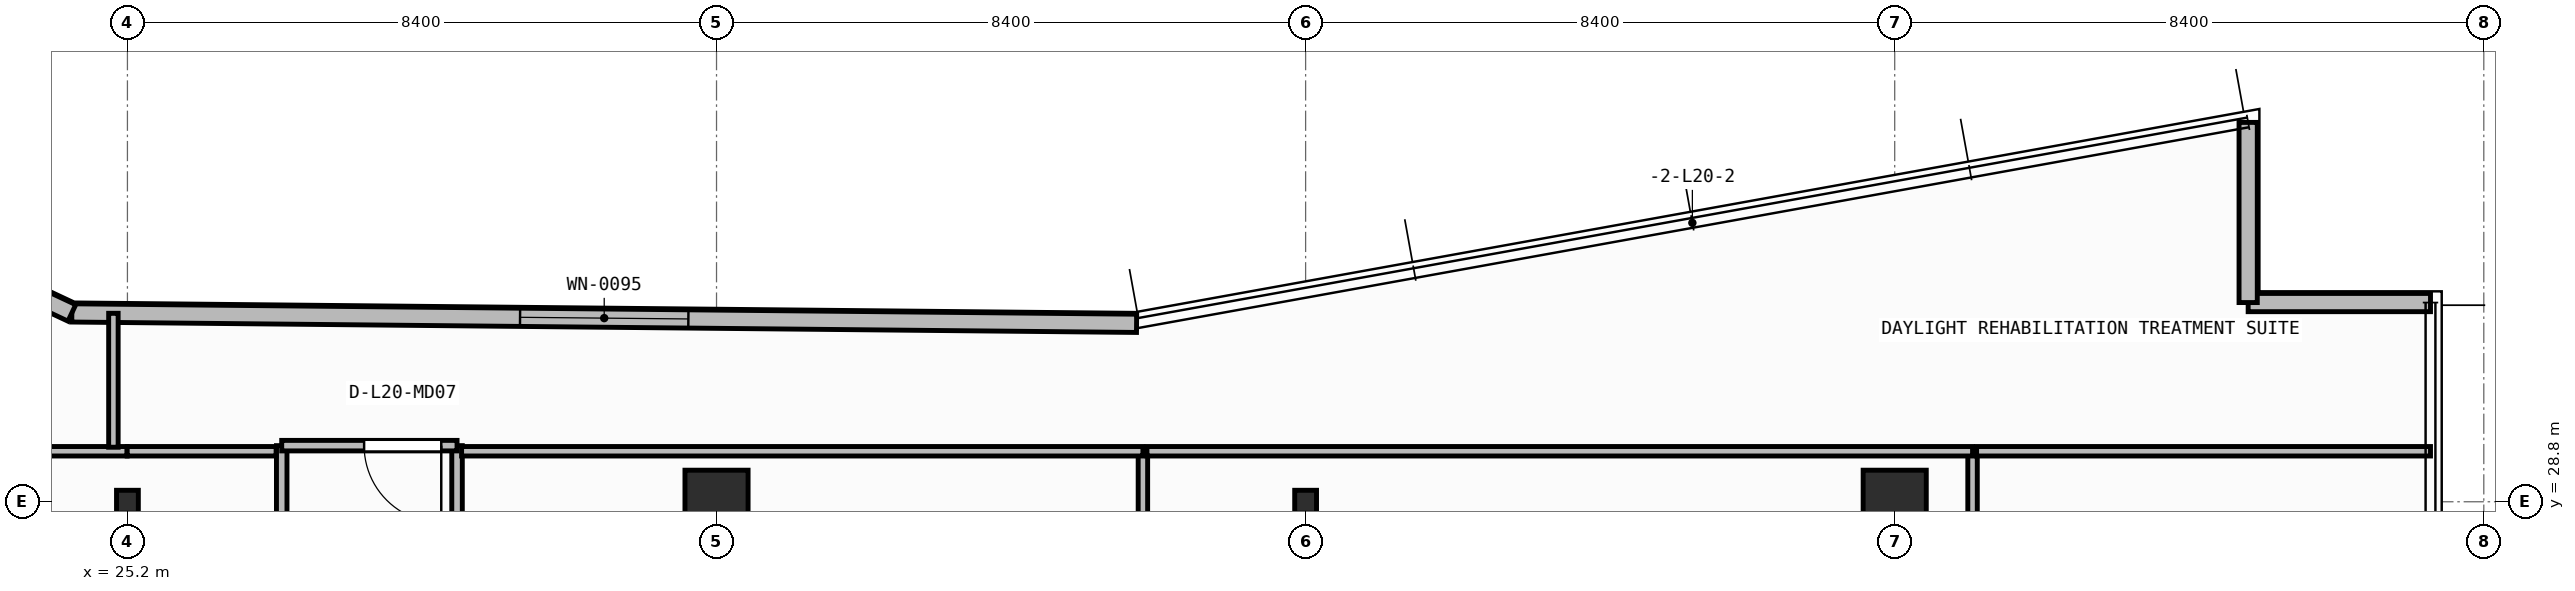
"""IFC4 building model, lengths in metres.
Left out: names, types, materials, properties, quantities, classifications, styles, units other than length and angle.
Written with IfcOpenShell. Run it as: python <this file> out.ifc"""

import sys

from ifc_helpers import new_model, si_unit, direction, frame, frame_2d, origin, origin_2d, place, context, subcontext, project, spatial, rectangle, i_section, extrude, element, fill, save


model = new_model("IFC4")
c1 = context("Model", 3, precision=1e-05, world=origin(), true_north=direction((0.0, 1.0)))
c2 = subcontext(c1, "Body", "Model", "MODEL_VIEW")
j1 = project(units=[si_unit("LENGTHUNIT", "METRE"), si_unit("PLANEANGLEUNIT", "RADIAN")], contexts=[c1])
p1 = place(None, origin())
s1 = spatial("IfcSite", under=j1, at=p1, CompositionType="ELEMENT")
p2 = place(p1, origin())
s2 = spatial("IfcBuilding", under=s1, at=p2, CompositionType="ELEMENT")
p3 = place(p2, frame((0.0, 0.0, 81.75)))
s3 = spatial("IfcBuildingStorey", under=s2, at=p3, CompositionType="ELEMENT", Elevation=81.75)
p4 = place(p3, frame((25.2, 28.8, 0.0), z_axis=(0.0, 0.0, 1.0), x_axis=(1.0, 0.0, 0.0)))
e1 = element("IfcColumn", 1, at=p4, inside=s3, PredefinedType="COLUMN", context=c2, shape_type="SweptSolid", body=[
    extrude(i_section(OverallWidth=0.311, OverallDepth=0.327, WebThickness=0.016, FlangeThickness=0.025, FilletRadius=0.017, at=origin_2d()), origin(), (0.0, 0.0, 1.0), 3.95),
])
p5 = place(p3, frame((33.6, 28.8, 0.0), z_axis=(0.0, 0.0, 1.0), x_axis=(1.0, 0.0, 0.0)))
e2 = element("IfcColumn", 2, at=p5, inside=s3, PredefinedType="COLUMN", context=c2, shape_type="SweptSolid", body=[
    extrude(rectangle(XDim=0.9, YDim=0.9, at=origin_2d()), origin(), (0.0, 0.0, 1.0), 3.95),
])
p6 = place(p3, frame((42.0, 28.8, 0.0), z_axis=(0.0, 0.0, 1.0), x_axis=(1.0, 0.0, 0.0)))
e3 = element("IfcColumn", 3, at=p6, inside=s3, PredefinedType="COLUMN", context=c2, shape_type="SweptSolid", body=[
    extrude(i_section(OverallWidth=0.311, OverallDepth=0.327, WebThickness=0.016, FlangeThickness=0.025, FilletRadius=0.017, at=origin_2d()), origin(), (0.0, 0.0, 1.0), 3.95),
])
p7 = place(p3, frame((50.4, 28.8, 0.0), z_axis=(0.0, 0.0, 1.0), x_axis=(1.0, 0.0, 0.0)))
e4 = element("IfcColumn", 4, at=p7, inside=s3, PredefinedType="COLUMN", context=c2, shape_type="SweptSolid", body=[
    extrude(rectangle(XDim=0.9, YDim=0.9, at=origin_2d()), origin(), (0.0, 0.0, 1.0), 3.95),
])
p8 = place(p3, frame((58.04, 31.64, 0.0), z_axis=(0.0, 0.0, 1.0), x_axis=(-1.0, 0.0, 0.0)))
e5 = element("IfcWall", 5, at=p8, inside=s3, PredefinedType="STANDARD", context=c2, shape_type="SweptSolid", body=[
    extrude(rectangle(XDim=2.6, YDim=0.26, at=frame_2d((1.3, 0.0))), origin(), (0.0, 0.0, 1.0), 3.71),
])
p9 = place(p3, frame((55.44, 31.64, 0.0), z_axis=(0.0, 0.0, 1.0), x_axis=(0.0, 1.0, 0.0)))
e6 = element("IfcWall", 6, at=p9, inside=s3, PredefinedType="STANDARD", context=c2, shape_type="SweptSolid", body=[
    extrude(rectangle(XDim=2.569, YDim=0.26, at=frame_2d((1.284, 0.0))), origin(), (0.0, 0.0, 1.0), 3.71),
])
p10 = place(p3, frame((39.59, 31.344, 0.0), z_axis=(0.0, 0.0, 1.0), x_axis=(-0.999952362926, 0.009760731435, 0.0)))
e7 = element("IfcWall", 7, at=p10, inside=s3, PredefinedType="STANDARD", context=c2, shape_type="SweptSolid", body=[
    extrude(rectangle(XDim=15.183, YDim=0.26, at=frame_2d((7.591, 0.0))), origin(), (0.0, 0.0, 1.0), 3.71),
])
p11 = place(p10, frame((6.391, 0.0, 0.9)))
e8 = element("IfcOpeningElement", 8, at=p11, cuts=e7, PredefinedType="OPENING", context=c2, shape_type="SweptSolid", body=[
    extrude(rectangle(XDim=2.4, YDim=1.65, at=frame_2d((1.2, 0.825))), frame((0.0, 0.14, 0.0), z_axis=(0.0, -1.0, 0.0), x_axis=(1.0, 0.0, 0.0)), (0.0, 0.0, 1.0), 0.28),
])
p12 = place(p3, frame((24.408, 31.492, 0.0), z_axis=(0.0, 0.0, 1.0), x_axis=(-0.905396522918, 0.424566998585, 0.0)))
e9 = element("IfcWall", 9, at=p12, inside=s3, PredefinedType="STANDARD", context=c2, shape_type="SweptSolid", body=[
    extrude(rectangle(XDim=14.189, YDim=0.26, at=frame_2d((7.095, 0.0))), origin(), (0.0, 0.0, 1.0), 3.71),
])
p13 = place(p12, frame((5.895, 0.0, 0.9)))
e10 = element("IfcOpeningElement", 10, at=p13, cuts=e9, PredefinedType="OPENING", context=c2, shape_type="SweptSolid", body=[
    extrude(rectangle(XDim=2.4, YDim=1.65, at=frame_2d((1.2, 0.825))), frame((0.0, 0.14, 0.0), z_axis=(0.0, -1.0, 0.0), x_axis=(1.0, 0.0, 0.0)), (0.0, 0.0, 1.0), 0.28),
])
p14 = place(p3, frame((27.4, 29.6, 0.0), z_axis=(0.0, 0.0, 1.0), x_axis=(0.0, -1.0, 0.0)))
e11 = element("IfcWall", 11, at=p14, inside=s3, PredefinedType="PARTITIONING", context=c2, shape_type="SweptSolid", body=[
    extrude(rectangle(XDim=7.232, YDim=0.15, at=frame_2d((3.616, 0.0))), origin(), (0.0, 0.0, 1.0), 3.71),
])
p15 = place(p14, frame((4.499, 0.0, 0.0)))
e12 = element("IfcOpeningElement", 12, at=p15, cuts=e11, PredefinedType="OPENING", context=c2, shape_type="SweptSolid", body=[
    extrude(rectangle(XDim=1.1, YDim=2.1, at=frame_2d((0.55, 1.05))), frame((0.0, 0.085, 0.0), z_axis=(0.0, -1.0, 0.0), x_axis=(1.0, 0.0, 0.0)), (0.0, 0.0, 1.0), 0.17),
])
p16 = place(p3, frame((29.9, 19.968, 0.0), z_axis=(0.0, 0.0, 1.0), x_axis=(0.0, 1.0, 0.0)))
e13 = element("IfcWall", 13, at=p16, inside=s3, PredefinedType="PARTITIONING", context=c2, shape_type="SweptSolid", body=[
    extrude(rectangle(XDim=9.632, YDim=0.15, at=frame_2d((4.816, 0.0))), origin(), (0.0, 0.0, 1.0), 3.71),
])
p17 = place(p16, frame((4.266, 0.0, 0.0)))
e14 = element("IfcOpeningElement", 14, at=p17, cuts=e13, PredefinedType="OPENING", context=c2, shape_type="SweptSolid", body=[
    extrude(rectangle(XDim=1.1, YDim=2.1, at=frame_2d((0.55, 1.05))), frame((0.0, 0.085, 0.0), z_axis=(0.0, -1.0, 0.0), x_axis=(1.0, 0.0, 0.0)), (0.0, 0.0, 1.0), 0.17),
])
p18 = place(p3, frame((29.9, 29.6, 0.0), z_axis=(0.0, 0.0, 1.0), x_axis=(-1.0, 0.0, 0.0)))
e15 = element("IfcWall", 15, at=p18, inside=s3, PredefinedType="PARTITIONING", context=c2, shape_type="SweptSolid", body=[
    extrude(rectangle(XDim=2.5, YDim=0.15, at=frame_2d((1.25, 0.0))), origin(), (0.0, 0.0, 1.0), 3.71),
])
p19 = place(p18, frame((0.225, 0.0, 0.0)))
e16 = element("IfcOpeningElement", 16, at=p19, cuts=e15, PredefinedType="OPENING", context=c2, shape_type="SweptSolid", body=[
    extrude(rectangle(XDim=1.1, YDim=2.1, at=frame_2d((0.55, 1.05))), frame((0.0, 0.085, 0.0), z_axis=(0.0, -1.0, 0.0), x_axis=(1.0, 0.0, 0.0)), (0.0, 0.0, 1.0), 0.17),
])
p20 = place(p3, frame((25.195, 29.52, 0.0), z_axis=(0.0, 0.0, 1.0), x_axis=(-1.0, 0.0, 0.0)))
e17 = element("IfcWall", 17, at=p20, inside=s3, PredefinedType="PARTITIONING", context=c2, shape_type="SweptSolid", body=[
    extrude(rectangle(XDim=13.147, YDim=0.135, at=frame_2d((6.573, 0.0))), origin(), (0.0, 0.0, 1.0), 3.71),
])
p21 = place(p3, frame((27.32, 29.52, 0.0), z_axis=(0.0, 0.0, 1.0), x_axis=(-1.0, 0.0, 0.0)))
e18 = element("IfcWall", 18, at=p21, inside=s3, PredefinedType="PARTITIONING", context=c2, shape_type="SweptSolid", body=[
    extrude(rectangle(XDim=2.124, YDim=0.135, at=frame_2d((1.062, 0.0))), origin(), (0.0, 0.0, 1.0), 3.71),
])
p22 = place(p3, frame((39.68, 19.798, 0.0), z_axis=(0.0, 0.0, 1.0), x_axis=(0.0, 1.0, 0.0)))
e19 = element("IfcWall", 19, at=p22, inside=s3, PredefinedType="PARTITIONING", context=c2, shape_type="SweptSolid", body=[
    extrude(rectangle(XDim=9.722, YDim=0.135, at=frame_2d((4.861, 0.0))), origin(), (0.0, 0.0, 1.0), 3.71),
])
p23 = place(p22, frame((4.311, 0.0, 0.0)))
e20 = element("IfcOpeningElement", 20, at=p23, cuts=e19, PredefinedType="OPENING", context=c2, shape_type="SweptSolid", body=[
    extrude(rectangle(XDim=1.1, YDim=2.1, at=frame_2d((0.55, 1.05))), frame((0.0, 0.077, 0.0), z_axis=(0.0, -1.0, 0.0), x_axis=(1.0, 0.0, 0.0)), (0.0, 0.0, 1.0), 0.155),
])
p24 = place(p3, frame((39.68, 29.52, 0.0), z_axis=(0.0, 0.0, 1.0), x_axis=(-1.0, 0.0, 0.0)))
e21 = element("IfcWall", 21, at=p24, inside=s3, PredefinedType="PARTITIONING", context=c2, shape_type="SweptSolid", body=[
    extrude(rectangle(XDim=9.715, YDim=0.135, at=frame_2d((4.857, 0.0))), origin(), (0.0, 0.0, 1.0), 3.71),
])
p25 = place(p3, frame((51.51, 19.798, 0.0), z_axis=(0.0, 0.0, 1.0), x_axis=(0.0, 1.0, 0.0)))
e22 = element("IfcWall", 22, at=p25, inside=s3, PredefinedType="PARTITIONING", context=c2, shape_type="SweptSolid", body=[
    extrude(rectangle(XDim=9.722, YDim=0.135, at=frame_2d((4.861, 0.0))), origin(), (0.0, 0.0, 1.0), 3.71),
])
p26 = place(p25, frame((4.311, 0.0, 0.0)))
e23 = element("IfcOpeningElement", 23, at=p26, cuts=e22, PredefinedType="OPENING", context=c2, shape_type="SweptSolid", body=[
    extrude(rectangle(XDim=1.1, YDim=2.1, at=frame_2d((0.55, 1.05))), frame((0.0, 0.077, 0.0), z_axis=(0.0, -1.0, 0.0), x_axis=(1.0, 0.0, 0.0)), (0.0, 0.0, 1.0), 0.155),
])
p27 = place(p3, frame((51.51, 29.52, 0.0), z_axis=(0.0, 0.0, 1.0), x_axis=(-1.0, 0.0, 0.0)))
e24 = element("IfcWall", 24, at=p27, inside=s3, PredefinedType="PARTITIONING", context=c2, shape_type="SweptSolid", body=[
    extrude(rectangle(XDim=11.772, YDim=0.135, at=frame_2d((5.886, 0.0))), origin(), (0.0, 0.0, 1.0), 3.71),
])
p28 = place(p3, frame((58.04, 29.52, 0.0), z_axis=(0.0, 0.0, 1.0), x_axis=(-1.0, 0.0, 0.0)))
e25 = element("IfcWall", 25, at=p28, inside=s3, PredefinedType="PARTITIONING", context=c2, shape_type="SweptSolid", body=[
    extrude(rectangle(XDim=6.473, YDim=0.135, at=frame_2d((3.236, 0.0))), origin(), (0.0, 0.0, 1.0), 3.71),
])
p29 = place(p3, frame((25.0, 29.577, 0.0), z_axis=(0.0, 0.0, 1.0), x_axis=(0.0, 1.0, 0.0)))
e26 = element("IfcWall", 26, at=p29, inside=s3, PredefinedType="PARTITIONING", context=c2, shape_type="SweptSolid", body=[
    extrude(rectangle(XDim=1.909, YDim=0.135, at=frame_2d((0.955, 0.0))), origin(), (0.0, 0.0, 1.0), 3.71),
])
p30 = place(p11, origin())
e27 = element("IfcWindow", 27, at=p30, inside=s3, PartitioningType="SINGLE_PANEL", PredefinedType="WINDOW", context=c2, shape_type="SweptSolid", body=[
    extrude(rectangle(XDim=2.4, YDim=1.65, at=frame_2d((1.2, 0.825))), frame((0.0, 0.03, 0.0), z_axis=(0.0, -1.0, 0.0), x_axis=(1.0, 0.0, 0.0)), (0.0, 0.0, 1.0), 0.06),
])
fill(e8, e27)
p31 = place(p19, origin())
e28 = element("IfcDoor", 28, at=p31, inside=s3, OperationType="SINGLE_SWING_LEFT", PredefinedType="DOOR", context=c2, shape_type="SweptSolid", body=[
    extrude(rectangle(XDim=1.1, YDim=2.1, at=frame_2d((0.55, 1.05))), frame((0.0, 0.025, 0.0), z_axis=(0.0, -1.0, 0.0), x_axis=(1.0, 0.0, 0.0)), (0.0, 0.0, 1.0), 0.05),
])
fill(e16, e28)
save(model, sys.argv[1])
